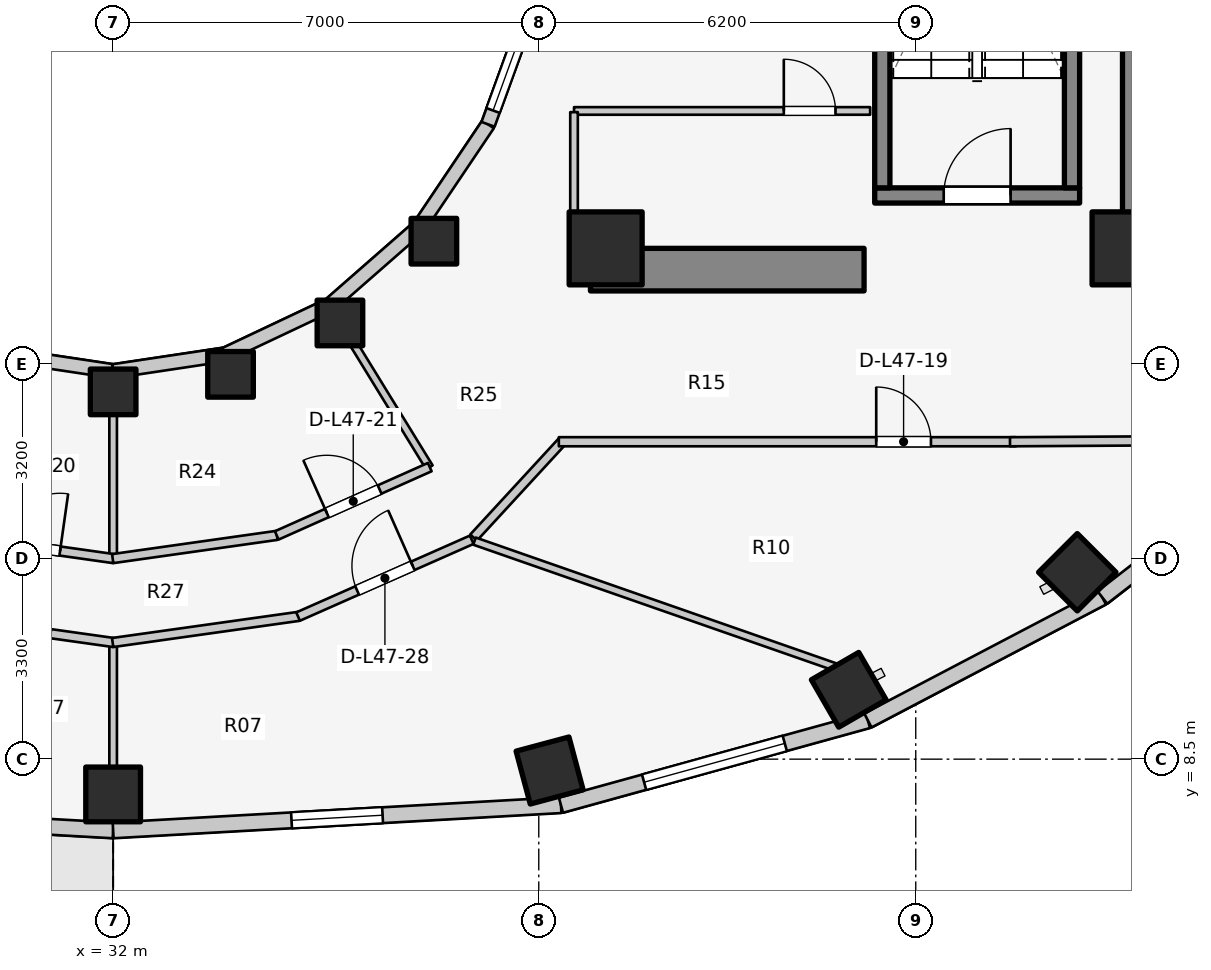
"""IFC4 building model, lengths in metres.
Left out: names, types, materials, properties, quantities, classifications, styles, units other than length and angle.
Written with IfcOpenShell. Run it as: python <this file> out.ifc"""

import sys

from ifc_helpers import new_model, si_unit, direction, frame, frame_2d, origin, origin_2d, place, context, subcontext, project, spatial, rectangle, extrude, element, fill, save


model = new_model("IFC4")
c1 = context("Model", 3, precision=1e-05, world=origin(), true_north=direction((0.0, 1.0)))
c2 = subcontext(c1, "Body", "Model", "MODEL_VIEW")
j1 = project(units=[si_unit("LENGTHUNIT", "METRE"), si_unit("PLANEANGLEUNIT", "RADIAN")], contexts=[c1])
p1 = place(None, origin())
s1 = spatial("IfcSite", under=j1, at=p1, CompositionType="ELEMENT")
p2 = place(p1, origin())
s2 = spatial("IfcBuilding", under=s1, at=p2, CompositionType="ELEMENT")
p3 = place(p2, frame((0.0, 0.0, 156.0)))
s3 = spatial("IfcBuildingStorey", under=s2, at=p3, CompositionType="ELEMENT", Elevation=156.0)
p4 = place(p3, frame((48.95, 17.05, 0.0), z_axis=(0.0, 0.0, 1.0), x_axis=(0.0, 1.0, 0.0)))
e1 = element("IfcWall", 1, at=p4, inside=s3, PredefinedType="SHEAR", context=c2, shape_type="SweptSolid", body=[
    extrude(rectangle(XDim=12.8, YDim=0.7, at=frame_2d((6.4, 0.0))), origin(), (0.0, 0.0, 1.0), 3.1),
])
p5 = place(p3, frame((39.85, 16.55, 0.0), z_axis=(0.0, 0.0, 1.0), x_axis=(1.0, 0.0, 0.0)))
e2 = element("IfcWall", 2, at=p5, inside=s3, PredefinedType="SHEAR", context=c2, shape_type="SweptSolid", body=[
    extrude(rectangle(XDim=4.5, YDim=0.7, at=frame_2d((2.25, 0.0))), origin(), (0.0, 0.0, 1.0), 3.1),
])
p6 = place(p3, frame((44.525, 17.77, 0.0), z_axis=(0.0, 0.0, 1.0), x_axis=(1.0, 0.0, 0.0)))
e3 = element("IfcWall", 3, at=p6, inside=s3, PredefinedType="SOLIDWALL", context=c2, shape_type="SweptSolid", body=[
    extrude(rectangle(XDim=3.37, YDim=0.25, at=frame_2d((1.685, 0.0))), origin(), (0.0, 0.0, 1.0), 3.1),
])
p7 = place(p6, frame((1.135, 0.0, 0.0)))
e4 = element("IfcOpeningElement", 4, at=p7, cuts=e3, PredefinedType="OPENING", context=c2, shape_type="SweptSolid", body=[
    extrude(rectangle(XDim=1.1, YDim=2.1, at=frame_2d((0.55, 1.05))), frame((0.0, 0.135, 0.0), z_axis=(0.0, -1.0, 0.0), x_axis=(1.0, 0.0, 0.0)), (0.0, 0.0, 1.0), 0.27),
])
for number, where, z_axis, x_axis in (
    (5, (44.65, 17.895, 0.0), (0.0, 0.0, 1.0), (0.0, 1.0, 0.0)),
    (6, (47.77, 17.895, 0.0), (0.0, 0.0, 1.0), (0.0, 1.0, 0.0)),
):
    element("IfcWall", number, at=place(p3, frame(where, z_axis=z_axis, x_axis=x_axis)), inside=s3, PredefinedType="SOLIDWALL", context=c2, shape_type="SweptSolid", body=[
        extrude(rectangle(XDim=7.81, YDim=0.25, at=frame_2d((3.905, 0.0))), origin(), (0.0, 0.0, 1.0), 3.1),
    ])
for number, where, z_axis, x_axis in (
    (7, (40.1, 16.9, 0.0), (0.0, 0.0, 1.0), (1.0, 0.0, 0.0)),
    (8, (48.7, 16.9, 0.0), (0.0, 0.0, 1.0), (1.0, 0.0, 0.0)),
):
    element("IfcColumn", number, at=place(p3, frame(where, z_axis=z_axis, x_axis=x_axis)), inside=s3, PredefinedType="COLUMN", context=c2, shape_type="SweptSolid", body=[
        extrude(rectangle(XDim=1.2, YDim=1.2, at=origin_2d()), origin(), (0.0, 0.0, 1.0), 3.1),
    ])
p8 = place(p3, frame((32.0, 14.54, 0.0), z_axis=(0.0, 0.0, 1.0), x_axis=(1.0, 0.0, 0.0)))
e9 = element("IfcColumn", 9, at=p8, inside=s3, PredefinedType="COLUMN", context=c2, shape_type="SweptSolid", body=[
    extrude(rectangle(XDim=0.75, YDim=0.75, at=origin_2d()), origin(), (0.0, 0.0, 1.0), 3.1),
])
p9 = place(p3, frame((32.0, 7.92, 0.0), z_axis=(0.0, 0.0, 1.0), x_axis=(0.0, -1.0, 0.0)))
e10 = element("IfcColumn", 10, at=p9, inside=s3, PredefinedType="COLUMN", context=c2, shape_type="SweptSolid", body=[
    extrude(rectangle(XDim=0.9, YDim=0.9, at=origin_2d()), origin(), (0.0, 0.0, 1.0), 3.1),
])
p10 = place(p3, frame((33.931, 14.828, 0.0), z_axis=(0.0, 0.0, 1.0), x_axis=(1.0, 0.0, 0.0)))
e11 = element("IfcColumn", 11, at=p10, inside=s3, PredefinedType="COLUMN", context=c2, shape_type="SweptSolid", body=[
    extrude(rectangle(XDim=0.75, YDim=0.75, at=origin_2d()), origin(), (0.0, 0.0, 1.0), 3.1),
])
p11 = place(p3, frame((39.178, 8.313, 0.0), z_axis=(0.0, 0.0, 1.0), x_axis=(0.258819045103, -0.965925826289, 0.0)))
e12 = element("IfcColumn", 12, at=p11, inside=s3, PredefinedType="COLUMN", context=c2, shape_type="SweptSolid", body=[
    extrude(rectangle(XDim=0.9, YDim=0.9, at=origin_2d()), origin(), (0.0, 0.0, 1.0), 3.1),
])
p12 = place(p3, frame((35.73, 15.673, 0.0), z_axis=(0.0, 0.0, 1.0), x_axis=(1.0, 0.0, 0.0)))
e13 = element("IfcColumn", 13, at=p12, inside=s3, PredefinedType="COLUMN", context=c2, shape_type="SweptSolid", body=[
    extrude(rectangle(XDim=0.75, YDim=0.75, at=origin_2d()), origin(), (0.0, 0.0, 1.0), 3.1),
])
p13 = place(p3, frame((44.098, 9.641, 0.0), z_axis=(0.0, 0.0, 1.0), x_axis=(0.5, -0.866025403784, 0.0)))
e14 = element("IfcColumn", 14, at=p13, inside=s3, PredefinedType="COLUMN", context=c2, shape_type="SweptSolid", body=[
    extrude(rectangle(XDim=0.9, YDim=0.9, at=origin_2d()), origin(), (0.0, 0.0, 1.0), 3.1),
])
p14 = place(p3, frame((37.275, 17.018, 0.0), z_axis=(0.0, 0.0, 1.0), x_axis=(1.0, 0.0, 0.0)))
e15 = element("IfcColumn", 15, at=p14, inside=s3, PredefinedType="COLUMN", context=c2, shape_type="SweptSolid", body=[
    extrude(rectangle(XDim=0.75, YDim=0.75, at=origin_2d()), origin(), (0.0, 0.0, 1.0), 3.1),
])
p15 = place(p3, frame((47.857, 11.573, 0.0), z_axis=(0.0, 0.0, 1.0), x_axis=(0.707106781187, -0.707106781187, 0.0)))
e16 = element("IfcColumn", 16, at=p15, inside=s3, PredefinedType="COLUMN", context=c2, shape_type="SweptSolid", body=[
    extrude(rectangle(XDim=0.9, YDim=0.9, at=origin_2d()), origin(), (0.0, 0.0, 1.0), 3.1),
])
for number, where, z_axis, x_axis in (
    (17, (30.157, 15.157, 0.0), (0.0, 0.0, 1.0), (0.989, -0.149, 0.0)),
    (18, (32.0, 14.88, 0.0), (0.0, 0.0, 1.0), (0.989, 0.149, 0.0)),
):
    element("IfcWall", number, at=place(p3, frame(where, z_axis=z_axis, x_axis=x_axis)), inside=s3, PredefinedType="STANDARD", context=c2, shape_type="SweptSolid", body=[
        extrude(rectangle(XDim=1.864, YDim=0.23, at=frame_2d((0.932, 0.0))), origin(), (0.0, 0.0, 1.0), 2.16),
    ])
p16 = place(p3, frame((33.843, 15.157, 0.0), z_axis=(0.0, 0.0, 1.0), x_axis=(0.904179699603, 0.427152280606, 0.0)))
e19 = element("IfcWall", 19, at=p16, inside=s3, PredefinedType="STANDARD", context=c2, shape_type="SweptSolid", body=[
    extrude(rectangle(XDim=1.899, YDim=0.23, at=frame_2d((0.95, 0.0))), origin(), (0.0, 0.0, 1.0), 2.16),
])
p17 = place(p3, frame((35.56, 15.968, 0.0), z_axis=(0.0, 0.0, 1.0), x_axis=(0.752576694707, 0.658504607869, 0.0)))
e20 = element("IfcWall", 20, at=p17, inside=s3, PredefinedType="STANDARD", context=c2, shape_type="SweptSolid", body=[
    extrude(rectangle(XDim=1.959, YDim=0.23, at=frame_2d((0.98, 0.0))), origin(), (0.0, 0.0, 1.0), 2.16),
])
p18 = place(p3, frame((37.035, 17.258, 0.0), z_axis=(0.0, 0.0, 1.0), x_axis=(0.558197800898, 0.829707909492, 0.0)))
e21 = element("IfcWall", 21, at=p18, inside=s3, PredefinedType="STANDARD", context=c2, shape_type="SweptSolid", body=[
    extrude(rectangle(XDim=2.027, YDim=0.23, at=frame_2d((1.013, 0.0))), origin(), (0.0, 0.0, 1.0), 2.16),
])
p19 = place(p3, frame((38.166, 18.94, 0.0), z_axis=(0.0, 0.0, 1.0), x_axis=(0.341423187295, 0.93990968033, 0.0)))
e22 = element("IfcWall", 22, at=p19, inside=s3, PredefinedType="STANDARD", context=c2, shape_type="SweptSolid", body=[
    extrude(rectangle(XDim=2.084, YDim=0.23, at=frame_2d((1.042, 0.0))), origin(), (0.0, 0.0, 1.0), 2.84),
])
p20 = place(p19, frame((0.242, 0.0, 0.85)))
e23 = element("IfcOpeningElement", 23, at=p20, cuts=e22, PredefinedType="OPENING", context=c2, shape_type="SweptSolid", body=[
    extrude(rectangle(XDim=1.6, YDim=1.65, at=frame_2d((0.8, 0.825))), frame((0.0, 0.125, 0.0), z_axis=(0.0, -1.0, 0.0), x_axis=(1.0, 0.0, 0.0)), (0.0, 0.0, 1.0), 0.25),
])
p21 = place(p3, frame((24.635, 7.743, 0.0), z_axis=(0.0, 0.0, 1.0), x_axis=(0.998417906562, -0.056228852534, 0.0)))
e24 = element("IfcWall", 24, at=p21, inside=s3, PredefinedType="STANDARD", context=c2, shape_type="SweptSolid", body=[
    extrude(rectangle(XDim=7.377, YDim=0.26, at=frame_2d((3.688, 0.0))), origin(), (0.0, 0.0, 1.0), 2.88),
])
p22 = place(p21, frame((3.088, 0.0, 0.0)))
e25 = element("IfcOpeningElement", 25, at=p22, cuts=e24, PredefinedType="OPENING", context=c2, shape_type="SweptSolid", body=[
    extrude(rectangle(XDim=1.2, YDim=2.2, at=frame_2d((0.6, 1.1))), frame((0.0, 0.14, 0.0), z_axis=(0.0, -1.0, 0.0), x_axis=(1.0, 0.0, 0.0)), (0.0, 0.0, 1.0), 0.28),
])
p23 = place(p3, frame((32.0, 7.329, 0.0), z_axis=(0.0, 0.0, 1.0), x_axis=(0.998417906562, 0.056228852534, 0.0)))
e26 = element("IfcWall", 26, at=p23, inside=s3, PredefinedType="STANDARD", context=c2, shape_type="SweptSolid", body=[
    extrude(rectangle(XDim=7.377, YDim=0.26, at=frame_2d((3.688, 0.0))), origin(), (0.0, 0.0, 1.0), 2.85),
])
p24 = place(p23, frame((2.938, 0.0, 0.75)))
e27 = element("IfcOpeningElement", 27, at=p24, cuts=e26, PredefinedType="OPENING", context=c2, shape_type="SweptSolid", body=[
    extrude(rectangle(XDim=1.5, YDim=1.6, at=frame_2d((0.75, 0.8))), frame((0.0, 0.14, 0.0), z_axis=(0.0, -1.0, 0.0), x_axis=(1.0, 0.0, 0.0)), (0.0, 0.0, 1.0), 0.28),
])
p25 = place(p3, frame((39.365, 7.743, 0.0), z_axis=(0.0, 0.0, 1.0), x_axis=(0.963953455704, 0.26607092144, 0.0)))
e28 = element("IfcWall", 28, at=p25, inside=s3, PredefinedType="STANDARD", context=c2, shape_type="SweptSolid", body=[
    extrude(rectangle(XDim=5.237, YDim=0.26, at=frame_2d((2.618, 0.0))), origin(), (0.0, 0.0, 1.0), 2.85),
])
p26 = place(p25, frame((1.418, 0.0, 0.75)))
e29 = element("IfcOpeningElement", 29, at=p26, cuts=e28, PredefinedType="OPENING", context=c2, shape_type="SweptSolid", body=[
    extrude(rectangle(XDim=2.4, YDim=1.7, at=frame_2d((1.2, 0.85))), frame((0.0, 0.14, 0.0), z_axis=(0.0, -1.0, 0.0), x_axis=(1.0, 0.0, 0.0)), (0.0, 0.0, 1.0), 0.28),
])
p27 = place(p3, frame((44.413, 9.137, 0.0), z_axis=(0.0, 0.0, 1.0), x_axis=(0.885660265226, 0.464333818065, 0.0)))
e30 = element("IfcWall", 30, at=p27, inside=s3, PredefinedType="STANDARD", context=c2, shape_type="SweptSolid", body=[
    extrude(rectangle(XDim=4.354, YDim=0.26, at=frame_2d((2.177, 0.0))), origin(), (0.0, 0.0, 1.0), 2.85),
])
p28 = place(p3, frame((48.269, 11.158, 0.0), z_axis=(0.0, 0.0, 1.0), x_axis=(0.790185650662, 0.612867552973, 0.0)))
e31 = element("IfcWall", 31, at=p28, inside=s3, PredefinedType="STANDARD", context=c2, shape_type="SweptSolid", body=[
    extrude(rectangle(XDim=4.239, YDim=0.26, at=frame_2d((2.12, 0.0))), origin(), (0.0, 0.0, 1.0), 2.85),
])
p29 = place(p28, frame((1.37, 0.0, 0.75)))
e32 = element("IfcOpeningElement", 32, at=p29, cuts=e31, PredefinedType="OPENING", context=c2, shape_type="SweptSolid", body=[
    extrude(rectangle(XDim=1.5, YDim=1.6, at=frame_2d((0.75, 0.8))), frame((0.0, 0.14, 0.0), z_axis=(0.0, -1.0, 0.0), x_axis=(1.0, 0.0, 0.0)), (0.0, 0.0, 1.0), 0.28),
])
p30 = place(p3, frame((39.58, 19.16, 0.0), z_axis=(0.0, 0.0, 1.0), x_axis=(1.0, 0.0, 0.0)))
e33 = element("IfcWall", 33, at=p30, inside=s3, PredefinedType="PARTITIONING", context=c2, shape_type="SweptSolid", body=[
    extrude(rectangle(XDim=4.87, YDim=0.125, at=frame_2d((2.435, 0.0))), origin(), (0.0, 0.0, 1.0), 2.12),
])
p31 = place(p30, frame((3.45, 0.0, 0.0)))
e34 = element("IfcOpeningElement", 34, at=p31, cuts=e33, PredefinedType="OPENING", context=c2, shape_type="SweptSolid", body=[
    extrude(rectangle(XDim=0.85, YDim=2.05, at=frame_2d((0.425, 1.025))), frame((0.0, 0.073, 0.0), z_axis=(0.0, -1.0, 0.0), x_axis=(1.0, 0.0, 0.0)), (0.0, 0.0, 1.0), 0.145),
])
p32 = place(p3, frame((39.58, 17.1, 0.0), z_axis=(0.0, 0.0, 1.0), x_axis=(0.0, 1.0, 0.0)))
e35 = element("IfcWall", 35, at=p32, inside=s3, PredefinedType="PARTITIONING", context=c2, shape_type="SweptSolid", body=[
    extrude(rectangle(XDim=2.04, YDim=0.125, at=frame_2d((1.02, 0.0))), origin(), (0.0, 0.0, 1.0), 2.232),
])
p33 = place(p3, frame((37.928, 12.144, 0.0), z_axis=(0.0, 0.0, 1.0), x_axis=(0.677579737957, 0.735449317567, 0.0)))
e36 = element("IfcWall", 36, at=p33, inside=s3, PredefinedType="PARTITIONING", context=c2, shape_type="SweptSolid", body=[
    extrude(rectangle(XDim=2.173, YDim=0.15, at=frame_2d((1.086, 0.0))), origin(), (0.0, 0.0, 1.0), 2.299),
])
p34 = place(p3, frame((39.33, 13.72, 0.0), z_axis=(0.0, 0.0, 1.0), x_axis=(1.0, 0.0, 0.0)))
e37 = element("IfcWall", 37, at=p34, inside=s3, PredefinedType="PARTITIONING", context=c2, shape_type="SweptSolid", body=[
    extrude(rectangle(XDim=7.52, YDim=0.15, at=frame_2d((3.76, 0.0))), origin(), (0.0, 0.0, 1.0), 2.299),
])
p35 = place(p34, frame((5.22, 0.0, 0.0)))
e38 = element("IfcOpeningElement", 38, at=p35, cuts=e37, PredefinedType="OPENING", context=c2, shape_type="SweptSolid", body=[
    extrude(rectangle(XDim=0.9, YDim=2.1, at=frame_2d((0.45, 1.05))), frame((0.0, 0.085, 0.0), z_axis=(0.0, -1.0, 0.0), x_axis=(1.0, 0.0, 0.0)), (0.0, 0.0, 1.0), 0.17),
])
p36 = place(p3, frame((46.75, 13.72, 0.0), z_axis=(0.0, 0.0, 1.0), x_axis=(0.999981712056, 0.006047772638, 0.0)))
e39 = element("IfcWall", 39, at=p36, inside=s3, PredefinedType="PARTITIONING", context=c2, shape_type="SweptSolid", body=[
    extrude(rectangle(XDim=4.885, YDim=0.15, at=frame_2d((2.442, 0.0))), origin(), (0.0, 0.0, 1.0), 2.22),
])
p37 = place(p3, frame((32.0, 14.9, 0.0), z_axis=(0.0, 0.0, 1.0), x_axis=(0.0, -1.0, 0.0)))
e40 = element("IfcWall", 40, at=p37, inside=s3, PredefinedType="PARTITIONING", context=c2, shape_type="SweptSolid", body=[
    extrude(rectangle(XDim=3.102, YDim=0.125, at=frame_2d((1.551, 0.0))), origin(), (0.0, 0.0, 1.0), 2.299),
])
p38 = place(p3, frame((35.55, 15.985, 0.0), z_axis=(0.0, 0.0, 1.0), x_axis=(0.523587550846, -0.851971875474, 0.0)))
e41 = element("IfcWall", 41, at=p38, inside=s3, PredefinedType="PARTITIONING", context=c2, shape_type="SweptSolid", body=[
    extrude(rectangle(XDim=3.153, YDim=0.125, at=frame_2d((1.577, 0.0))), origin(), (0.0, 0.0, 1.0), 2.299),
])
p39 = place(p3, frame((29.306, 12.18, 0.0), z_axis=(0.0, 0.0, 1.0), x_axis=(0.990145400278, -0.140043158738, 0.0)))
e42 = element("IfcWall", 42, at=p39, inside=s3, PredefinedType="PARTITIONING", context=c2, shape_type="SweptSolid", body=[
    extrude(rectangle(XDim=2.728, YDim=0.15, at=frame_2d((1.364, 0.0))), origin(), (0.0, 0.0, 1.0), 2.299),
])
p40 = place(p39, frame((0.889, 0.0, 0.0)))
e43 = element("IfcOpeningElement", 43, at=p40, cuts=e42, PredefinedType="OPENING", context=c2, shape_type="SweptSolid", body=[
    extrude(rectangle(XDim=0.95, YDim=2.1, at=frame_2d((0.475, 1.05))), frame((0.0, 0.085, 0.0), z_axis=(0.0, -1.0, 0.0), x_axis=(1.0, 0.0, 0.0)), (0.0, 0.0, 1.0), 0.17),
])
p41 = place(p3, frame((31.993, 11.798, 0.0), z_axis=(0.0, 0.0, 1.0), x_axis=(0.990145400278, 0.140043158738, 0.0)))
e44 = element("IfcWall", 44, at=p41, inside=s3, PredefinedType="PARTITIONING", context=c2, shape_type="SweptSolid", body=[
    extrude(rectangle(XDim=2.728, YDim=0.15, at=frame_2d((1.364, 0.0))), origin(), (0.0, 0.0, 1.0), 2.299),
])
p42 = place(p3, frame((34.69, 12.179, 0.0), z_axis=(0.0, 0.0, 1.0), x_axis=(0.913145536541, 0.407633694749, 0.0)))
e45 = element("IfcWall", 45, at=p42, inside=s3, PredefinedType="PARTITIONING", context=c2, shape_type="SweptSolid", body=[
    extrude(rectangle(XDim=2.756, YDim=0.15, at=frame_2d((1.378, 0.0))), origin(), (0.0, 0.0, 1.0), 2.299),
])
p43 = place(p42, frame((0.903, 0.0, 0.0)))
e46 = element("IfcOpeningElement", 46, at=p43, cuts=e45, PredefinedType="OPENING", context=c2, shape_type="SweptSolid", body=[
    extrude(rectangle(XDim=0.95, YDim=2.1, at=frame_2d((0.475, 1.05))), frame((0.0, 0.085, 0.0), z_axis=(0.0, -1.0, 0.0), x_axis=(1.0, 0.0, 0.0)), (0.0, 0.0, 1.0), 0.17),
])
p44 = place(p3, frame((32.0, 10.363, 0.0), z_axis=(0.0, 0.0, 1.0), x_axis=(0.0, -1.0, 0.0)))
e47 = element("IfcWall", 47, at=p44, inside=s3, PredefinedType="PARTITIONING", context=c2, shape_type="SweptSolid", body=[
    extrude(rectangle(XDim=2.013, YDim=0.125, at=frame_2d((1.006, 0.0))), origin(), (0.0, 0.0, 1.0), 2.299),
])
p45 = place(p3, frame((37.943, 12.086, 0.0), z_axis=(0.0, 0.0, 1.0), x_axis=(0.944182779284, -0.329422038278, 0.0)))
e48 = element("IfcWall", 48, at=p45, inside=s3, PredefinedType="PARTITIONING", context=c2, shape_type="SweptSolid", body=[
    extrude(rectangle(XDim=6.291, YDim=0.125, at=frame_2d((3.146, 0.0))), origin(), (0.0, 0.0, 1.0), 2.299),
])
p46 = place(p3, frame((28.943, 10.849, 0.0), z_axis=(0.0, 0.0, 1.0), x_axis=(0.990254709652, -0.13926812274, 0.0)))
e49 = element("IfcWall", 49, at=p46, inside=s3, PredefinedType="PARTITIONING", context=c2, shape_type="SweptSolid", body=[
    extrude(rectangle(XDim=3.096, YDim=0.15, at=frame_2d((1.548, 0.0))), origin(), (0.0, 0.0, 1.0), 2.299),
])
p47 = place(p46, frame((1.048, 0.0, 0.0)))
e50 = element("IfcOpeningElement", 50, at=p47, cuts=e49, PredefinedType="OPENING", context=c2, shape_type="SweptSolid", body=[
    extrude(rectangle(XDim=1.0, YDim=2.1, at=frame_2d((0.5, 1.05))), frame((0.0, 0.085, 0.0), z_axis=(0.0, -1.0, 0.0), x_axis=(1.0, 0.0, 0.0)), (0.0, 0.0, 1.0), 0.17),
])
p48 = place(p3, frame((31.992, 10.418, 0.0), z_axis=(0.0, 0.0, 1.0), x_axis=(0.990254709652, 0.13926812274, 0.0)))
e51 = element("IfcWall", 51, at=p48, inside=s3, PredefinedType="PARTITIONING", context=c2, shape_type="SweptSolid", body=[
    extrude(rectangle(XDim=3.096, YDim=0.15, at=frame_2d((1.548, 0.0))), origin(), (0.0, 0.0, 1.0), 2.299),
])
p49 = place(p3, frame((35.042, 10.844, 0.0), z_axis=(0.0, 0.0, 1.0), x_axis=(0.914519212393, 0.40454247016, 0.0)))
e52 = element("IfcWall", 52, at=p49, inside=s3, PredefinedType="PARTITIONING", context=c2, shape_type="SweptSolid", body=[
    extrude(rectangle(XDim=3.124, YDim=0.15, at=frame_2d((1.562, 0.0))), origin(), (0.0, 0.0, 1.0), 2.299),
])
p50 = place(p49, frame((1.062, 0.0, 0.0)))
e53 = element("IfcOpeningElement", 53, at=p50, cuts=e52, PredefinedType="OPENING", context=c2, shape_type="SweptSolid", body=[
    extrude(rectangle(XDim=1.0, YDim=2.1, at=frame_2d((0.5, 1.05))), frame((0.0, 0.085, 0.0), z_axis=(0.0, -1.0, 0.0), x_axis=(1.0, 0.0, 0.0)), (0.0, 0.0, 1.0), 0.17),
])
p51 = place(p20, origin())
e54 = element("IfcWindow", 54, at=p51, inside=s3, PartitioningType="SINGLE_PANEL", PredefinedType="WINDOW", context=c2, shape_type="SweptSolid", body=[
    extrude(rectangle(XDim=1.6, YDim=1.65, at=frame_2d((0.8, 0.825))), frame((0.0, 0.03, 0.0), z_axis=(0.0, -1.0, 0.0), x_axis=(1.0, 0.0, 0.0)), (0.0, 0.0, 1.0), 0.06),
])
fill(e23, e54)
p52 = place(p24, origin())
e55 = element("IfcWindow", 55, at=p52, inside=s3, PartitioningType="SINGLE_PANEL", PredefinedType="WINDOW", context=c2, shape_type="SweptSolid", body=[
    extrude(rectangle(XDim=1.5, YDim=1.6, at=frame_2d((0.75, 0.8))), frame((0.0, 0.03, 0.0), z_axis=(0.0, -1.0, 0.0), x_axis=(1.0, 0.0, 0.0)), (0.0, 0.0, 1.0), 0.06),
])
fill(e27, e55)
p53 = place(p26, origin())
e56 = element("IfcWindow", 56, at=p53, inside=s3, PartitioningType="SINGLE_PANEL", PredefinedType="WINDOW", context=c2, shape_type="SweptSolid", body=[
    extrude(rectangle(XDim=2.4, YDim=1.7, at=frame_2d((1.2, 0.85))), frame((0.0, 0.03, 0.0), z_axis=(0.0, -1.0, 0.0), x_axis=(1.0, 0.0, 0.0)), (0.0, 0.0, 1.0), 0.06),
])
fill(e29, e56)
p54 = place(p7, origin())
e57 = element("IfcDoor", 57, at=p54, inside=s3, OperationType="SINGLE_SWING_RIGHT", PredefinedType="DOOR", context=c2, shape_type="SweptSolid", body=[
    extrude(rectangle(XDim=1.1, YDim=2.1, at=frame_2d((0.55, 1.05))), frame((0.0, 0.025, 0.0), z_axis=(0.0, -1.0, 0.0), x_axis=(1.0, 0.0, 0.0)), (0.0, 0.0, 1.0), 0.05),
])
fill(e4, e57)
p55 = place(p31, origin())
e58 = element("IfcDoor", 58, at=p55, inside=s3, OperationType="SINGLE_SWING_LEFT", PredefinedType="DOOR", context=c2, shape_type="SweptSolid", body=[
    extrude(rectangle(XDim=0.85, YDim=2.05, at=frame_2d((0.425, 1.025))), frame((0.0, 0.025, 0.0), z_axis=(0.0, -1.0, 0.0), x_axis=(1.0, 0.0, 0.0)), (0.0, 0.0, 1.0), 0.05),
])
fill(e34, e58)
p56 = place(p35, origin())
e59 = element("IfcDoor", 59, at=p56, inside=s3, OperationType="SINGLE_SWING_LEFT", PredefinedType="DOOR", context=c2, shape_type="SweptSolid", body=[
    extrude(rectangle(XDim=0.9, YDim=2.1, at=frame_2d((0.45, 1.05))), frame((0.0, 0.025, 0.0), z_axis=(0.0, -1.0, 0.0), x_axis=(1.0, 0.0, 0.0)), (0.0, 0.0, 1.0), 0.05),
])
fill(e38, e59)
p57 = place(p40, origin())
e60 = element("IfcDoor", 60, at=p57, inside=s3, OperationType="SINGLE_SWING_RIGHT", PredefinedType="DOOR", context=c2, shape_type="SweptSolid", body=[
    extrude(rectangle(XDim=0.95, YDim=2.1, at=frame_2d((0.475, 1.05))), frame((0.0, 0.025, 0.0), z_axis=(0.0, -1.0, 0.0), x_axis=(1.0, 0.0, 0.0)), (0.0, 0.0, 1.0), 0.05),
])
fill(e43, e60)
p58 = place(p43, origin())
e61 = element("IfcDoor", 61, at=p58, inside=s3, OperationType="SINGLE_SWING_LEFT", PredefinedType="DOOR", context=c2, shape_type="SweptSolid", body=[
    extrude(rectangle(XDim=0.95, YDim=2.1, at=frame_2d((0.475, 1.05))), frame((0.0, 0.025, 0.0), z_axis=(0.0, -1.0, 0.0), x_axis=(1.0, 0.0, 0.0)), (0.0, 0.0, 1.0), 0.05),
])
fill(e46, e61)
p59 = place(p50, origin())
e62 = element("IfcDoor", 62, at=p59, inside=s3, OperationType="SINGLE_SWING_RIGHT", PredefinedType="DOOR", context=c2, shape_type="SweptSolid", body=[
    extrude(rectangle(XDim=1.0, YDim=2.1, at=frame_2d((0.5, 1.05))), frame((0.0, 0.025, 0.0), z_axis=(0.0, -1.0, 0.0), x_axis=(1.0, 0.0, 0.0)), (0.0, 0.0, 1.0), 0.05),
])
fill(e53, e62)
save(model, sys.argv[1])
